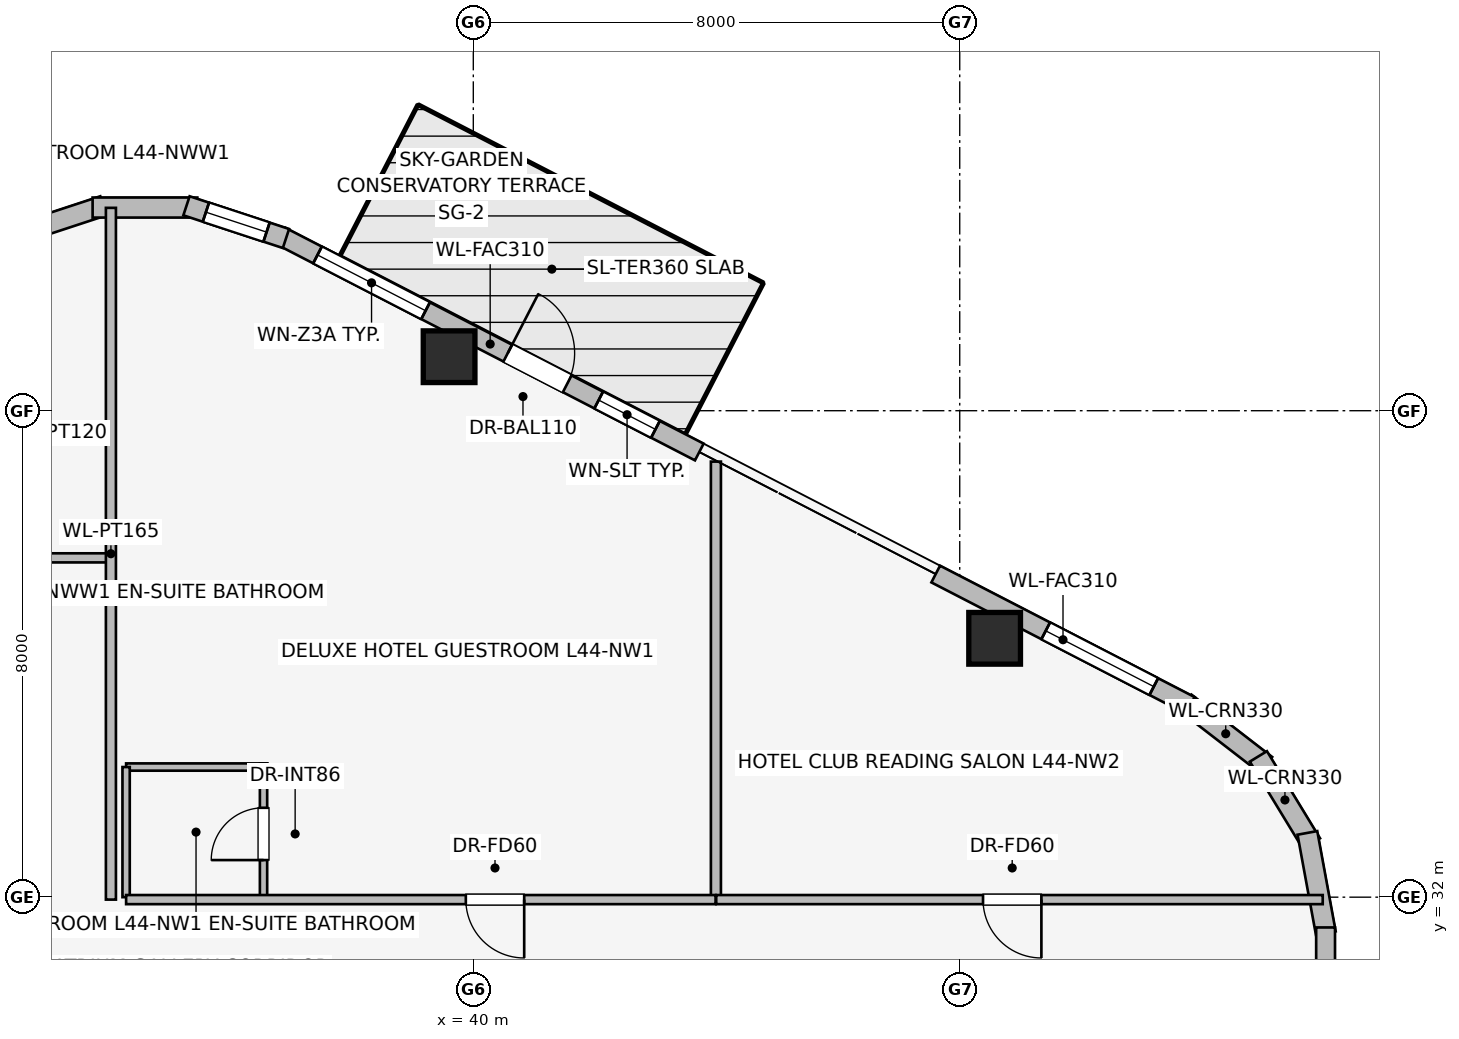
"""IFC4 building model, lengths in metres.
Left out: names, types, materials, properties, quantities, classifications, styles, units other than length and angle.
Written with IfcOpenShell. Run it as: python <this file> out.ifc"""

import sys

from ifc_helpers import new_model, si_unit, direction, frame, frame_2d, origin, origin_2d, place, context, subcontext, project, spatial, rectangle, extrude, element, fill, save


model = new_model("IFC4")
c1 = context("Model", 3, precision=1e-05, world=origin(), true_north=direction((0.0, 1.0)))
c2 = subcontext(c1, "Body", "Model", "MODEL_VIEW")
j1 = project(units=[si_unit("LENGTHUNIT", "METRE"), si_unit("PLANEANGLEUNIT", "RADIAN")], contexts=[c1])
p1 = place(None, origin())
s1 = spatial("IfcSite", under=j1, at=p1, CompositionType="ELEMENT")
p2 = place(p1, origin())
s2 = spatial("IfcBuilding", under=s1, at=p2, CompositionType="ELEMENT")
p3 = place(p2, frame((0.0, 0.0, 163.65)))
s3 = spatial("IfcBuildingStorey", under=s2, at=p3, CompositionType="ELEMENT", Elevation=163.65)
for number, where, z_axis, x_axis in (
    (1, (48.574, 36.257, 0.0), (0.0, 0.0, 1.0), (1.0, 0.0, 0.0)),
    (2, (39.602, 40.888, 0.0), (0.0, 0.0, 1.0), (1.0, 0.0, 0.0)),
):
    element("IfcColumn", number, at=place(p3, frame(where, z_axis=z_axis, x_axis=x_axis)), inside=s3, PredefinedType="COLUMN", context=c2, shape_type="SweptSolid", body=[
        extrude(rectangle(XDim=0.85, YDim=0.85, at=origin_2d()), origin(), (0.0, 0.0, 1.0), 3.45),
    ])
p4 = place(p3, frame((51.711, 35.2, 0.0), z_axis=(0.0, 0.0, 1.0), x_axis=(0.791464279355, -0.611215423976, 0.0)))
e3 = element("IfcWall", 3, at=p4, inside=s3, PredefinedType="STANDARD", context=c2, shape_type="SweptSolid", body=[
    extrude(rectangle(XDim=1.677, YDim=0.33, at=frame_2d((0.838, 0.0))), origin(), (0.0, 0.0, 1.0), 3.19),
])
p5 = place(p3, frame((52.912, 34.315, 0.0), z_axis=(0.0, 0.0, 1.0), x_axis=(0.520219286058, -0.85403272444, 0.0)))
e4 = element("IfcWall", 4, at=p5, inside=s3, PredefinedType="STANDARD", context=c2, shape_type="SweptSolid", body=[
    extrude(rectangle(XDim=1.678, YDim=0.33, at=frame_2d((0.839, 0.0))), origin(), (0.0, 0.0, 1.0), 3.19),
])
p6 = place(p3, frame((53.718, 33.057, 0.0), z_axis=(0.0, 0.0, 1.0), x_axis=(0.180717642671, -0.983535019014, 0.0)))
e5 = element("IfcWall", 5, at=p6, inside=s3, PredefinedType="STANDARD", context=c2, shape_type="SweptSolid", body=[
    extrude(rectangle(XDim=1.677, YDim=0.33, at=frame_2d((0.838, 0.0))), origin(), (0.0, 0.0, 1.0), 3.19),
])
p7 = place(p3, frame((36.838, 42.871, 0.0), z_axis=(0.0, 0.0, 1.0), x_axis=(0.888645948291, -0.458593914686, 0.0)))
e6 = element("IfcWall", 6, at=p7, inside=s3, PredefinedType="STANDARD", context=c2, shape_type="SweptSolid", body=[
    extrude(rectangle(XDim=7.741, YDim=0.31, at=frame_2d((3.871, 0.0))), origin(), (0.0, 0.0, 1.0), 3.19),
])
p8 = place(p7, frame((4.196, 0.0, 0.0)))
e7 = element("IfcOpeningElement", 7, at=p8, cuts=e6, PredefinedType="OPENING", context=c2, shape_type="SweptSolid", body=[
    extrude(rectangle(XDim=1.1, YDim=2.04, at=frame_2d((0.55, 1.02))), frame((0.0, 0.165, 0.0), z_axis=(0.0, -1.0, 0.0), x_axis=(1.0, 0.0, 0.0)), (0.0, 0.0, 1.0), 0.33),
])
p9 = place(p7, frame((0.675, 0.0, 0.75)))
e8 = element("IfcOpeningElement", 8, at=p9, cuts=e6, PredefinedType="OPENING", context=c2, shape_type="SweptSolid", body=[
    extrude(rectangle(XDim=2.0, YDim=1.5, at=frame_2d((1.0, 0.75))), frame((0.0, 0.165, 0.0), z_axis=(0.0, -1.0, 0.0), x_axis=(1.0, 0.0, 0.0)), (0.0, 0.0, 1.0), 0.33),
])
p10 = place(p7, frame((5.879, 0.0, 0.75)))
e9 = element("IfcOpeningElement", 9, at=p10, cuts=e6, PredefinedType="OPENING", context=c2, shape_type="SweptSolid", body=[
    extrude(rectangle(XDim=1.05, YDim=1.4, at=frame_2d((0.525, 0.7))), frame((0.0, 0.165, 0.0), z_axis=(0.0, -1.0, 0.0), x_axis=(1.0, 0.0, 0.0)), (0.0, 0.0, 1.0), 0.33),
])
p11 = place(p3, frame((47.605, 37.314, 0.0), z_axis=(0.0, 0.0, 1.0), x_axis=(0.888633599899, -0.458617842141, 0.0)))
e10 = element("IfcWall", 10, at=p11, inside=s3, PredefinedType="STANDARD", context=c2, shape_type="SweptSolid", body=[
    extrude(rectangle(XDim=4.712, YDim=0.31, at=frame_2d((2.356, 0.0))), origin(), (0.0, 0.0, 1.0), 3.19),
])
p12 = place(p11, frame((2.036, 0.0, 0.75)))
e11 = element("IfcOpeningElement", 11, at=p12, cuts=e10, PredefinedType="OPENING", context=c2, shape_type="SweptSolid", body=[
    extrude(rectangle(XDim=2.0, YDim=1.5, at=frame_2d((1.0, 0.75))), frame((0.0, 0.165, 0.0), z_axis=(0.0, -1.0, 0.0), x_axis=(1.0, 0.0, 0.0)), (0.0, 0.0, 1.0), 0.33),
])
p13 = place(p3, frame((32.281, 42.832, 0.0), z_axis=(0.0, 0.0, 1.0), x_axis=(0.949937416267, 0.312440242569, 0.0)))
e12 = element("IfcWall", 12, at=p13, inside=s3, PredefinedType="STANDARD", context=c2, shape_type="SweptSolid", body=[
    extrude(rectangle(XDim=1.722, YDim=0.33, at=frame_2d((0.861, 0.0))), origin(), (0.0, 0.0, 1.0), 3.19),
])
p14 = place(p3, frame((33.739, 43.341, 0.0), z_axis=(0.0, 0.0, 1.0), x_axis=(1.0, 0.0, 0.0)))
e13 = element("IfcWall", 13, at=p14, inside=s3, PredefinedType="STANDARD", context=c2, shape_type="SweptSolid", body=[
    extrude(rectangle(XDim=1.722, YDim=0.33, at=frame_2d((0.861, 0.0))), origin(), (0.0, 0.0, 1.0), 3.19),
])
p15 = place(p3, frame((35.283, 43.37, 0.0), z_axis=(0.0, 0.0, 1.0), x_axis=(0.949937416267, -0.312440242569, 0.0)))
e14 = element("IfcWall", 14, at=p15, inside=s3, PredefinedType="STANDARD", context=c2, shape_type="SweptSolid", body=[
    extrude(rectangle(XDim=1.722, YDim=0.33, at=frame_2d((0.861, 0.0))), origin(), (0.0, 0.0, 1.0), 3.19),
])
p16 = place(p15, frame((0.336, 0.0, 0.75)))
e15 = element("IfcOpeningElement", 15, at=p16, cuts=e14, PredefinedType="OPENING", context=c2, shape_type="SweptSolid", body=[
    extrude(rectangle(XDim=1.05, YDim=1.4, at=frame_2d((0.525, 0.7))), frame((0.0, 0.175, 0.0), z_axis=(0.0, -1.0, 0.0), x_axis=(1.0, 0.0, 0.0)), (0.0, 0.0, 1.0), 0.35),
])
p17 = place(p3, frame((54.017, 31.502, 0.0), z_axis=(0.0, 0.0, 1.0), x_axis=(0.0, -1.0, 0.0)))
e16 = element("IfcWall", 16, at=p17, inside=s3, PredefinedType="STANDARD", context=c2, shape_type="SweptSolid", body=[
    extrude(rectangle(XDim=15.004, YDim=0.31, at=frame_2d((7.502, 0.0))), origin(), (0.0, 0.0, 1.0), 3.19),
])
p18 = place(p17, frame((4.353, 0.0, 0.75)))
e17 = element("IfcOpeningElement", 17, at=p18, cuts=e16, PredefinedType="OPENING", context=c2, shape_type="SweptSolid", body=[
    extrude(rectangle(XDim=2.0, YDim=1.5, at=frame_2d((1.0, 0.75))), frame((0.0, 0.165, 0.0), z_axis=(0.0, -1.0, 0.0), x_axis=(1.0, 0.0, 0.0)), (0.0, 0.0, 1.0), 0.33),
])
p19 = place(p17, frame((8.083, 0.0, 0.75)))
e18 = element("IfcOpeningElement", 18, at=p19, cuts=e16, PredefinedType="OPENING", context=c2, shape_type="SweptSolid", body=[
    extrude(rectangle(XDim=1.35, YDim=1.45, at=frame_2d((0.675, 0.725))), frame((0.0, 0.165, 0.0), z_axis=(0.0, -1.0, 0.0), x_axis=(1.0, 0.0, 0.0)), (0.0, 0.0, 1.0), 0.33),
])
p20 = place(p17, frame((9.87, 0.0, 0.75)))
e19 = element("IfcOpeningElement", 19, at=p20, cuts=e16, PredefinedType="OPENING", context=c2, shape_type="SweptSolid", body=[
    extrude(rectangle(XDim=1.35, YDim=1.45, at=frame_2d((0.675, 0.725))), frame((0.0, 0.165, 0.0), z_axis=(0.0, -1.0, 0.0), x_axis=(1.0, 0.0, 0.0)), (0.0, 0.0, 1.0), 0.33),
])
p21 = place(p3, frame((34.0, 39.64, 0.0), z_axis=(0.0, 0.0, 1.0), x_axis=(-1.0, 0.0, 0.0)))
e20 = element("IfcWall", 20, at=p21, inside=s3, PredefinedType="PARTITIONING", context=c2, shape_type="SweptSolid", body=[
    extrude(rectangle(XDim=2.34, YDim=0.12, at=frame_2d((1.17, 0.0))), origin(), (0.0, 0.0, 1.0), 3.19),
])
p22 = place(p3, frame((34.0, 37.58, 0.0), z_axis=(0.0, 0.0, 1.0), x_axis=(-1.0, 0.0, 0.0)))
e21 = element("IfcWall", 21, at=p22, inside=s3, PredefinedType="PARTITIONING", context=c2, shape_type="SweptSolid", body=[
    extrude(rectangle(XDim=12.075, YDim=0.15, at=frame_2d((6.038, 0.0))), origin(), (0.0, 0.0, 1.0), 3.19),
])
p23 = place(p22, frame((4.96, 0.0, 0.0)))
e22 = element("IfcOpeningElement", 22, at=p23, cuts=e21, PredefinedType="OPENING", context=c2, shape_type="SweptSolid", body=[
    extrude(rectangle(XDim=0.96, YDim=2.0, at=frame_2d((0.48, 1.0))), frame((0.0, 0.085, 0.0), z_axis=(0.0, -1.0, 0.0), x_axis=(1.0, 0.0, 0.0)), (0.0, 0.0, 1.0), 0.17),
])
p24 = place(p3, frame((34.04, 31.96, 0.0), z_axis=(0.0, 0.0, 1.0), x_axis=(0.0, 1.0, 0.0)))
e23 = element("IfcWall", 23, at=p24, inside=s3, PredefinedType="PARTITIONING", context=c2, shape_type="SweptSolid", body=[
    extrude(rectangle(XDim=11.376, YDim=0.165, at=frame_2d((5.688, 0.0))), origin(), (0.0, 0.0, 1.0), 3.19),
])
p25 = place(p3, frame((43.99, 31.97, 0.0), z_axis=(0.0, 0.0, 1.0), x_axis=(0.0, 1.0, 0.0)))
e24 = element("IfcWall", 24, at=p25, inside=s3, PredefinedType="PARTITIONING", context=c2, shape_type="SweptSolid", body=[
    extrude(rectangle(XDim=7.193, YDim=0.165, at=frame_2d((3.597, 0.0))), origin(), (0.0, 0.0, 1.0), 3.19),
])
p26 = place(p3, frame((36.55, 31.96, 0.0), z_axis=(0.0, 0.0, 1.0), x_axis=(0.0, 1.0, 0.0)))
e25 = element("IfcWall", 25, at=p26, inside=s3, PredefinedType="PARTITIONING", context=c2, shape_type="SweptSolid", body=[
    extrude(rectangle(XDim=2.24, YDim=0.12, at=frame_2d((1.12, 0.0))), origin(), (0.0, 0.0, 1.0), 3.19),
])
p27 = place(p26, frame((0.65, 0.0, 0.0)))
e26 = element("IfcOpeningElement", 26, at=p27, cuts=e25, PredefinedType="OPENING", context=c2, shape_type="SweptSolid", body=[
    extrude(rectangle(XDim=0.86, YDim=2.0, at=frame_2d((0.43, 1.0))), frame((0.0, 0.07, 0.0), z_axis=(0.0, -1.0, 0.0), x_axis=(1.0, 0.0, 0.0)), (0.0, 0.0, 1.0), 0.14),
])
p28 = place(p3, frame((36.61, 34.14, 0.0), z_axis=(0.0, 0.0, 1.0), x_axis=(-1.0, 0.0, 0.0)))
e27 = element("IfcWall", 27, at=p28, inside=s3, PredefinedType="PARTITIONING", context=c2, shape_type="SweptSolid", body=[
    extrude(rectangle(XDim=2.32, YDim=0.12, at=frame_2d((1.16, 0.0))), origin(), (0.0, 0.0, 1.0), 3.19),
])
p29 = place(p3, frame((34.29, 34.14, 0.0), z_axis=(0.0, 0.0, 1.0), x_axis=(0.0, -1.0, 0.0)))
e28 = element("IfcWall", 28, at=p29, inside=s3, PredefinedType="PARTITIONING", context=c2, shape_type="SweptSolid", body=[
    extrude(rectangle(XDim=2.14, YDim=0.12, at=frame_2d((1.07, 0.0))), origin(), (0.0, 0.0, 1.0), 3.19),
])
p30 = place(p3, frame((43.985, 31.96, 0.0), z_axis=(0.0, 0.0, 1.0), x_axis=(-1.0, 0.0, 0.0)))
e29 = element("IfcWall", 29, at=p30, inside=s3, PredefinedType="PARTITIONING", context=c2, shape_type="SweptSolid", body=[
    extrude(rectangle(XDim=9.695, YDim=0.15, at=frame_2d((4.848, 0.0))), origin(), (0.0, 0.0, 1.0), 3.19),
])
p31 = place(p30, frame((3.148, 0.0, 0.0)))
e30 = element("IfcOpeningElement", 30, at=p31, cuts=e29, PredefinedType="OPENING", context=c2, shape_type="SweptSolid", body=[
    extrude(rectangle(XDim=0.96, YDim=2.0, at=frame_2d((0.48, 1.0))), frame((0.0, 0.085, 0.0), z_axis=(0.0, -1.0, 0.0), x_axis=(1.0, 0.0, 0.0)), (0.0, 0.0, 1.0), 0.17),
])
p32 = place(p3, frame((53.97, 31.96, 0.0), z_axis=(0.0, 0.0, 1.0), x_axis=(-1.0, 0.0, 0.0)))
e31 = element("IfcWall", 31, at=p32, inside=s3, PredefinedType="PARTITIONING", context=c2, shape_type="SweptSolid", body=[
    extrude(rectangle(XDim=9.975, YDim=0.15, at=frame_2d((4.987, 0.0))), origin(), (0.0, 0.0, 1.0), 3.19),
])
p33 = place(p32, frame((4.627, 0.0, 0.0)))
e32 = element("IfcOpeningElement", 32, at=p33, cuts=e31, PredefinedType="OPENING", context=c2, shape_type="SweptSolid", body=[
    extrude(rectangle(XDim=0.96, YDim=2.0, at=frame_2d((0.48, 1.0))), frame((0.0, 0.085, 0.0), z_axis=(0.0, -1.0, 0.0), x_axis=(1.0, 0.0, 0.0)), (0.0, 0.0, 1.0), 0.17),
])
p34 = place(p8, origin())
e33 = element("IfcDoor", 33, at=p34, inside=s3, OperationType="SINGLE_SWING_LEFT", PredefinedType="DOOR", context=c2, shape_type="SweptSolid", body=[
    extrude(rectangle(XDim=1.1, YDim=2.04, at=frame_2d((0.55, 1.02))), frame((0.0, 0.025, 0.0), z_axis=(0.0, -1.0, 0.0), x_axis=(1.0, 0.0, 0.0)), (0.0, 0.0, 1.0), 0.05),
])
fill(e7, e33)
p35 = place(p9, origin())
e34 = element("IfcWindow", 34, at=p35, inside=s3, PartitioningType="SINGLE_PANEL", PredefinedType="WINDOW", context=c2, shape_type="SweptSolid", body=[
    extrude(rectangle(XDim=2.0, YDim=1.5, at=frame_2d((1.0, 0.75))), frame((0.0, 0.03, 0.0), z_axis=(0.0, -1.0, 0.0), x_axis=(1.0, 0.0, 0.0)), (0.0, 0.0, 1.0), 0.06),
])
fill(e8, e34)
p36 = place(p10, origin())
e35 = element("IfcWindow", 35, at=p36, inside=s3, PartitioningType="SINGLE_PANEL", PredefinedType="WINDOW", context=c2, shape_type="SweptSolid", body=[
    extrude(rectangle(XDim=1.05, YDim=1.4, at=frame_2d((0.525, 0.7))), frame((0.0, 0.03, 0.0), z_axis=(0.0, -1.0, 0.0), x_axis=(1.0, 0.0, 0.0)), (0.0, 0.0, 1.0), 0.06),
])
fill(e9, e35)
p37 = place(p12, origin())
e36 = element("IfcWindow", 36, at=p37, inside=s3, PartitioningType="SINGLE_PANEL", PredefinedType="WINDOW", context=c2, shape_type="SweptSolid", body=[
    extrude(rectangle(XDim=2.0, YDim=1.5, at=frame_2d((1.0, 0.75))), frame((0.0, 0.03, 0.0), z_axis=(0.0, -1.0, 0.0), x_axis=(1.0, 0.0, 0.0)), (0.0, 0.0, 1.0), 0.06),
])
fill(e11, e36)
p38 = place(p16, origin())
e37 = element("IfcWindow", 37, at=p38, inside=s3, PartitioningType="SINGLE_PANEL", PredefinedType="WINDOW", context=c2, shape_type="SweptSolid", body=[
    extrude(rectangle(XDim=1.05, YDim=1.4, at=frame_2d((0.525, 0.7))), frame((0.0, 0.03, 0.0), z_axis=(0.0, -1.0, 0.0), x_axis=(1.0, 0.0, 0.0)), (0.0, 0.0, 1.0), 0.06),
])
fill(e15, e37)
p39 = place(p27, origin())
e38 = element("IfcDoor", 38, at=p39, inside=s3, OperationType="SINGLE_SWING_LEFT", PredefinedType="DOOR", context=c2, shape_type="SweptSolid", body=[
    extrude(rectangle(XDim=0.86, YDim=2.0, at=frame_2d((0.43, 1.0))), frame((0.0, 0.025, 0.0), z_axis=(0.0, -1.0, 0.0), x_axis=(1.0, 0.0, 0.0)), (0.0, 0.0, 1.0), 0.05),
])
fill(e26, e38)
p40 = place(p31, origin())
e39 = element("IfcDoor", 39, at=p40, inside=s3, OperationType="SINGLE_SWING_LEFT", PredefinedType="DOOR", context=c2, shape_type="SweptSolid", body=[
    extrude(rectangle(XDim=0.96, YDim=2.0, at=frame_2d((0.48, 1.0))), frame((0.0, 0.025, 0.0), z_axis=(0.0, -1.0, 0.0), x_axis=(1.0, 0.0, 0.0)), (0.0, 0.0, 1.0), 0.05),
])
fill(e30, e39)
p41 = place(p33, origin())
e40 = element("IfcDoor", 40, at=p41, inside=s3, OperationType="SINGLE_SWING_LEFT", PredefinedType="DOOR", context=c2, shape_type="SweptSolid", body=[
    extrude(rectangle(XDim=0.96, YDim=2.0, at=frame_2d((0.48, 1.0))), frame((0.0, 0.025, 0.0), z_axis=(0.0, -1.0, 0.0), x_axis=(1.0, 0.0, 0.0)), (0.0, 0.0, 1.0), 0.05),
])
fill(e32, e40)
save(model, sys.argv[1])
